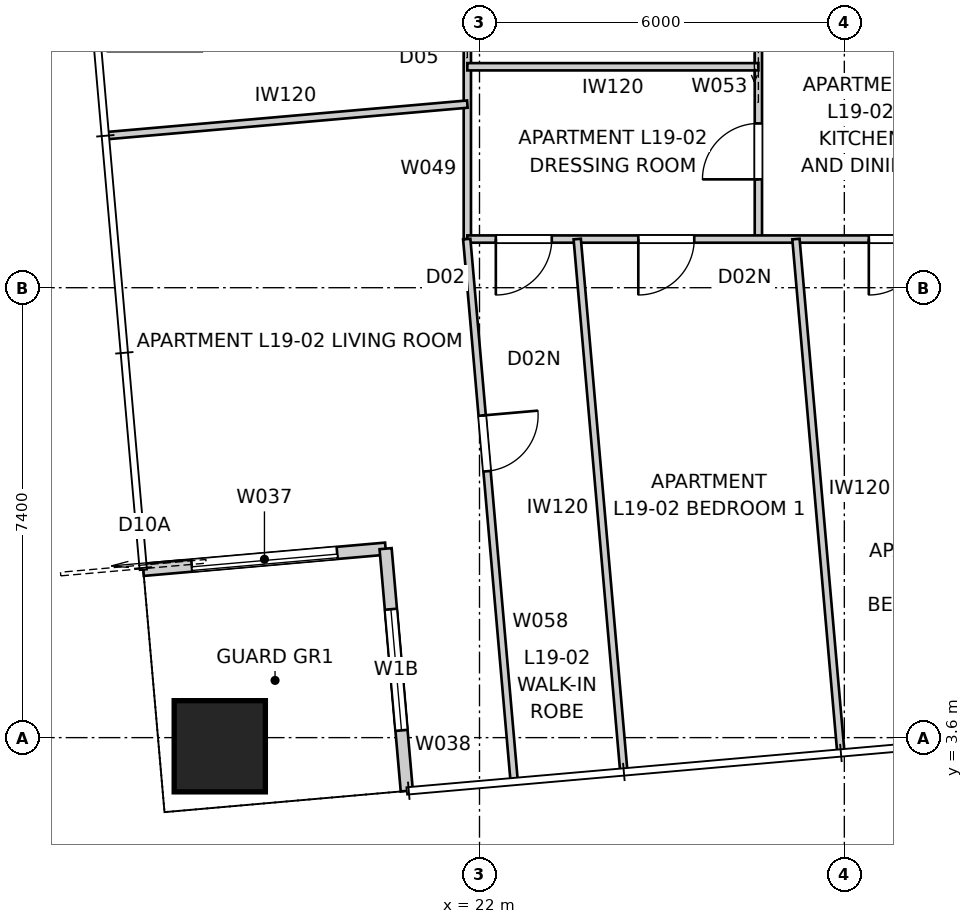
"""IFC4 building model, lengths in metres.
Left out: names, types, materials, properties, quantities, classifications, styles, units other than length and angle.
Written with IfcOpenShell. Run it as: python <this file> out.ifc"""

import sys

from ifc_helpers import new_model, si_unit, direction, frame, frame_2d, origin, origin_2d, place, context, subcontext, project, spatial, rectangle, extrude, element, fill, save


model = new_model("IFC4")
c1 = context("Model", 3, precision=1e-05, world=origin(), true_north=direction((0.0, 1.0)))
c2 = subcontext(c1, "Body", "Model", "MODEL_VIEW")
j1 = project(units=[si_unit("LENGTHUNIT", "METRE"), si_unit("PLANEANGLEUNIT", "RADIAN")], contexts=[c1])
p1 = place(None, origin())
s1 = spatial("IfcSite", under=j1, at=p1, CompositionType="ELEMENT")
p2 = place(p1, origin())
s2 = spatial("IfcBuilding", under=s1, at=p2, CompositionType="ELEMENT")
p3 = place(p2, frame((0.0, 0.0, 71.0)))
s3 = spatial("IfcBuildingStorey", under=s2, at=p3, CompositionType="ELEMENT", Elevation=71.0)
p4 = place(p3, frame((17.729, 3.458, 0.0), z_axis=(0.0, 0.0, 1.0), x_axis=(1.0, 0.0, 0.0)))
e1 = element("IfcColumn", 1, at=p4, inside=s3, PredefinedType="COLUMN", context=c2, shape_type="SweptSolid", body=[
    extrude(rectangle(XDim=1.5, YDim=1.5, at=origin_2d()), origin(), (0.0, 0.0, 1.0), 3.2),
])
p5 = place(p3, frame((16.471, 6.359, 0.0), z_axis=(0.0, 0.0, 1.0), x_axis=(0.99619418125, 0.087161650072, 0.0)))
e2 = element("IfcWall", 2, at=p5, inside=s3, PredefinedType="SOLIDWALL", context=c2, shape_type="SweptSolid", body=[
    extrude(rectangle(XDim=4.0, YDim=0.2, at=frame_2d((2.0, 0.0))), origin(), (0.0, 0.0, 1.0), 3.2),
])
p6 = place(p5, frame((0.8, 0.0, 0.0)))
e3 = element("IfcOpeningElement", 3, at=p6, cuts=e2, PredefinedType="OPENING", context=c2, shape_type="SweptSolid", body=[
    extrude(rectangle(XDim=2.4, YDim=2.1, at=frame_2d((1.2, 1.05))), frame((0.0, 0.11, 0.0), z_axis=(0.0, -1.0, 0.0), x_axis=(1.0, 0.0, 0.0)), (0.0, 0.0, 1.0), 0.22),
])
p7 = place(p3, frame((20.456, 6.708, 0.0), z_axis=(0.0, 0.0, 1.0), x_axis=(0.087156350505, -0.99619464492, 0.0)))
e4 = element("IfcWall", 4, at=p7, inside=s3, PredefinedType="SOLIDWALL", context=c2, shape_type="SweptSolid", body=[
    extrude(rectangle(XDim=4.0, YDim=0.2, at=frame_2d((2.0, 0.0))), origin(), (0.0, 0.0, 1.0), 3.2),
])
p8 = place(p7, frame((1.0, 0.0, 0.4)))
e5 = element("IfcOpeningElement", 5, at=p8, cuts=e4, PredefinedType="OPENING", context=c2, shape_type="SweptSolid", body=[
    extrude(rectangle(XDim=2.0, YDim=1.8, at=frame_2d((1.0, 0.9))), frame((0.0, 0.11, 0.0), z_axis=(0.0, -1.0, 0.0), x_axis=(1.0, 0.0, 0.0)), (0.0, 0.0, 1.0), 0.22),
])
p9 = place(p3, frame((21.8, 11.8, 0.0), z_axis=(0.0, 0.0, 1.0), x_axis=(0.0, 1.0, 0.0)))
e6 = element("IfcWall", 6, at=p9, inside=s3, PredefinedType="PARTITIONING", context=c2, shape_type="SweptSolid", body=[
    extrude(rectangle(XDim=20.065, YDim=0.12, at=frame_2d((10.032, 0.0))), origin(), (0.0, 0.0, 1.0), 3.2),
])
p10 = place(p9, frame((6.798, 0.0, 0.0)))
e7 = element("IfcOpeningElement", 7, at=p10, cuts=e6, PredefinedType="OPENING", context=c2, shape_type="SweptSolid", body=[
    extrude(rectangle(XDim=0.92, YDim=2.34, at=frame_2d((0.46, 1.17))), frame((0.0, 0.07, 0.0), z_axis=(0.0, -1.0, 0.0), x_axis=(1.0, 0.0, 0.0)), (0.0, 0.0, 1.0), 0.14),
])
p11 = place(p9, frame((3.845, 0.0, 0.0)))
e8 = element("IfcOpeningElement", 8, at=p11, cuts=e6, PredefinedType="OPENING", context=c2, shape_type="SweptSolid", body=[
    extrude(rectangle(XDim=0.96, YDim=2.1, at=frame_2d((0.48, 1.05))), frame((0.0, 0.07, 0.0), z_axis=(0.0, -1.0, 0.0), x_axis=(1.0, 0.0, 0.0)), (0.0, 0.0, 1.0), 0.14),
])
p12 = place(p9, frame((10.732, 0.0, 0.0)))
e9 = element("IfcOpeningElement", 9, at=p12, cuts=e6, PredefinedType="OPENING", context=c2, shape_type="SweptSolid", body=[
    extrude(rectangle(XDim=0.96, YDim=2.1, at=frame_2d((0.48, 1.05))), frame((0.0, 0.07, 0.0), z_axis=(0.0, -1.0, 0.0), x_axis=(1.0, 0.0, 0.0)), (0.0, 0.0, 1.0), 0.14),
])
p13 = place(p9, frame((17.856, 0.0, 0.0)))
e10 = element("IfcOpeningElement", 10, at=p13, cuts=e6, PredefinedType="OPENING", context=c2, shape_type="SweptSolid", body=[
    extrude(rectangle(XDim=0.96, YDim=2.1, at=frame_2d((0.48, 1.05))), frame((0.0, 0.07, 0.0), z_axis=(0.0, -1.0, 0.0), x_axis=(1.0, 0.0, 0.0)), (0.0, 0.0, 1.0), 0.14),
])
p14 = place(p9, frame((15.027, 0.0, 0.0)))
e11 = element("IfcOpeningElement", 11, at=p14, cuts=e6, PredefinedType="OPENING", context=c2, shape_type="SweptSolid", body=[
    extrude(rectangle(XDim=0.96, YDim=2.1, at=frame_2d((0.48, 1.05))), frame((0.0, 0.07, 0.0), z_axis=(0.0, -1.0, 0.0), x_axis=(1.0, 0.0, 0.0)), (0.0, 0.0, 1.0), 0.14),
])
p15 = place(p3, frame((26.586, 11.8, 0.0), z_axis=(0.0, 0.0, 1.0), x_axis=(0.0, 1.0, 0.0)))
e12 = element("IfcWall", 12, at=p15, inside=s3, PredefinedType="PARTITIONING", context=c2, shape_type="SweptSolid", body=[
    extrude(rectangle(XDim=4.4, YDim=0.12, at=frame_2d((2.2, 0.0))), origin(), (0.0, 0.0, 1.0), 3.2),
])
p16 = place(p15, frame((0.982, 0.0, 0.0)))
e13 = element("IfcOpeningElement", 13, at=p16, cuts=e12, PredefinedType="OPENING", context=c2, shape_type="SweptSolid", body=[
    extrude(rectangle(XDim=0.92, YDim=2.0, at=frame_2d((0.46, 1.0))), frame((0.0, 0.07, 0.0), z_axis=(0.0, -1.0, 0.0), x_axis=(1.0, 0.0, 0.0)), (0.0, 0.0, 1.0), 0.14),
])
p17 = place(p15, frame((3.112, 0.0, 0.0)))
e14 = element("IfcOpeningElement", 14, at=p17, cuts=e12, PredefinedType="OPENING", context=c2, shape_type="SweptSolid", body=[
    extrude(rectangle(XDim=0.96, YDim=2.1, at=frame_2d((0.48, 1.05))), frame((0.0, 0.07, 0.0), z_axis=(0.0, -1.0, 0.0), x_axis=(1.0, 0.0, 0.0)), (0.0, 0.0, 1.0), 0.14),
])
p18 = place(p3, frame((58.2, 11.8, 0.0), z_axis=(0.0, 0.0, 1.0), x_axis=(-1.0, 0.0, 0.0)))
e15 = element("IfcWall", 15, at=p18, inside=s3, PredefinedType="PARTITIONING", context=c2, shape_type="SweptSolid", body=[
    extrude(rectangle(XDim=36.4, YDim=0.12, at=frame_2d((18.2, 0.0))), origin(), (0.0, 0.0, 1.0), 3.2),
])
p19 = place(p18, frame((11.12, 0.0, 0.0)))
e16 = element("IfcOpeningElement", 16, at=p19, cuts=e15, PredefinedType="OPENING", context=c2, shape_type="SweptSolid", body=[
    extrude(rectangle(XDim=0.92, YDim=2.34, at=frame_2d((0.46, 1.17))), frame((0.0, 0.07, 0.0), z_axis=(0.0, -1.0, 0.0), x_axis=(1.0, 0.0, 0.0)), (0.0, 0.0, 1.0), 0.14),
])
p20 = place(p18, frame((17.971, 0.0, 0.0)))
e17 = element("IfcOpeningElement", 17, at=p20, cuts=e15, PredefinedType="OPENING", context=c2, shape_type="SweptSolid", body=[
    extrude(rectangle(XDim=0.92, YDim=2.34, at=frame_2d((0.46, 1.17))), frame((0.0, 0.07, 0.0), z_axis=(0.0, -1.0, 0.0), x_axis=(1.0, 0.0, 0.0)), (0.0, 0.0, 1.0), 0.14),
])
p21 = place(p18, frame((28.877, 0.0, 0.0)))
e18 = element("IfcOpeningElement", 18, at=p21, cuts=e15, PredefinedType="OPENING", context=c2, shape_type="SweptSolid", body=[
    extrude(rectangle(XDim=0.92, YDim=2.34, at=frame_2d((0.46, 1.17))), frame((0.0, 0.07, 0.0), z_axis=(0.0, -1.0, 0.0), x_axis=(1.0, 0.0, 0.0)), (0.0, 0.0, 1.0), 0.14),
])
p22 = place(p18, frame((7.16, 0.0, 0.0)))
e19 = element("IfcOpeningElement", 19, at=p22, cuts=e15, PredefinedType="OPENING", context=c2, shape_type="SweptSolid", body=[
    extrude(rectangle(XDim=0.96, YDim=2.1, at=frame_2d((0.48, 1.05))), frame((0.0, 0.07, 0.0), z_axis=(0.0, -1.0, 0.0), x_axis=(1.0, 0.0, 0.0)), (0.0, 0.0, 1.0), 0.14),
])
p23 = place(p18, frame((15.181, 0.0, 0.0)))
e20 = element("IfcOpeningElement", 20, at=p23, cuts=e15, PredefinedType="OPENING", context=c2, shape_type="SweptSolid", body=[
    extrude(rectangle(XDim=0.96, YDim=2.1, at=frame_2d((0.48, 1.05))), frame((0.0, 0.07, 0.0), z_axis=(0.0, -1.0, 0.0), x_axis=(1.0, 0.0, 0.0)), (0.0, 0.0, 1.0), 0.14),
])
p24 = place(p18, frame((32.668, 0.0, 0.0)))
e21 = element("IfcOpeningElement", 21, at=p24, cuts=e15, PredefinedType="OPENING", context=c2, shape_type="SweptSolid", body=[
    extrude(rectangle(XDim=0.92, YDim=2.0, at=frame_2d((0.46, 1.0))), frame((0.0, 0.07, 0.0), z_axis=(0.0, -1.0, 0.0), x_axis=(1.0, 0.0, 0.0)), (0.0, 0.0, 1.0), 0.14),
])
p25 = place(p18, frame((35.011, 0.0, 0.0)))
e22 = element("IfcOpeningElement", 22, at=p25, cuts=e15, PredefinedType="OPENING", context=c2, shape_type="SweptSolid", body=[
    extrude(rectangle(XDim=0.92, YDim=2.34, at=frame_2d((0.46, 1.17))), frame((0.0, 0.07, 0.0), z_axis=(0.0, -1.0, 0.0), x_axis=(1.0, 0.0, 0.0)), (0.0, 0.0, 1.0), 0.14),
])
p26 = place(p18, frame((0.675, 0.0, 0.0)))
e23 = element("IfcOpeningElement", 23, at=p26, cuts=e15, PredefinedType="OPENING", context=c2, shape_type="SweptSolid", body=[
    extrude(rectangle(XDim=0.92, YDim=2.34, at=frame_2d((0.46, 1.17))), frame((0.0, 0.07, 0.0), z_axis=(0.0, -1.0, 0.0), x_axis=(1.0, 0.0, 0.0)), (0.0, 0.0, 1.0), 0.14),
])
p27 = place(p18, frame((25.11, 0.0, 0.0)))
e24 = element("IfcOpeningElement", 24, at=p27, cuts=e15, PredefinedType="OPENING", context=c2, shape_type="SweptSolid", body=[
    extrude(rectangle(XDim=0.96, YDim=2.1, at=frame_2d((0.48, 1.05))), frame((0.0, 0.07, 0.0), z_axis=(0.0, -1.0, 0.0), x_axis=(1.0, 0.0, 0.0)), (0.0, 0.0, 1.0), 0.14),
])
p28 = place(p18, frame((3.904, 0.0, 0.0)))
e25 = element("IfcOpeningElement", 25, at=p28, cuts=e15, PredefinedType="OPENING", context=c2, shape_type="SweptSolid", body=[
    extrude(rectangle(XDim=0.96, YDim=2.1, at=frame_2d((0.48, 1.05))), frame((0.0, 0.07, 0.0), z_axis=(0.0, -1.0, 0.0), x_axis=(1.0, 0.0, 0.0)), (0.0, 0.0, 1.0), 0.14),
])
p29 = place(p3, frame((26.586, 14.634, 0.0), z_axis=(0.0, 0.0, 1.0), x_axis=(-1.0, 0.0, 0.0)))
e26 = element("IfcWall", 26, at=p29, inside=s3, PredefinedType="PARTITIONING", context=c2, shape_type="SweptSolid", body=[
    extrude(rectangle(XDim=4.786, YDim=0.12, at=frame_2d((2.393, 0.0))), origin(), (0.0, 0.0, 1.0), 2.399),
])
p30 = place(p3, frame((15.886, 13.502, 0.0), z_axis=(0.0, 0.0, 1.0), x_axis=(0.996195547509, 0.087146033323, 0.0)))
e27 = element("IfcWall", 27, at=p30, inside=s3, PredefinedType="PARTITIONING", context=c2, shape_type="SweptSolid", body=[
    extrude(rectangle(XDim=5.937, YDim=0.12, at=frame_2d((2.968, 0.0))), origin(), (0.0, 0.0, 1.0), 2.399),
])
p31 = place(p3, frame((21.79, 11.8, 0.0), z_axis=(0.0, 0.0, 1.0), x_axis=(0.087153024244, -0.996194935926, 0.0)))
e28 = element("IfcWall", 28, at=p31, inside=s3, PredefinedType="PARTITIONING", context=c2, shape_type="SweptSolid", body=[
    extrude(rectangle(XDim=8.917, YDim=0.12, at=frame_2d((4.458, 0.0))), origin(), (0.0, 0.0, 1.0), 3.2),
])
p32 = place(p31, frame((2.913, 0.0, 0.0)))
e29 = element("IfcOpeningElement", 29, at=p32, cuts=e28, PredefinedType="OPENING", context=c2, shape_type="SweptSolid", body=[
    extrude(rectangle(XDim=0.92, YDim=2.0, at=frame_2d((0.46, 1.0))), frame((0.0, 0.07, 0.0), z_axis=(0.0, -1.0, 0.0), x_axis=(1.0, 0.0, 0.0)), (0.0, 0.0, 1.0), 0.14),
])
p33 = place(p3, frame((27.204, 11.8, 0.0), z_axis=(0.0, 0.0, 1.0), x_axis=(0.087167308925, -0.996193686115, 0.0)))
e30 = element("IfcWall", 30, at=p33, inside=s3, PredefinedType="PARTITIONING", context=c2, shape_type="SweptSolid", body=[
    extrude(rectangle(XDim=8.445, YDim=0.12, at=frame_2d((4.222, 0.0))), origin(), (0.0, 0.0, 1.0), 2.399),
])
p34 = place(p3, frame((24.371, 3.075, 0.0), z_axis=(0.0, 0.0, 1.0), x_axis=(-0.087169716747, 0.996193475426, 0.0)))
e31 = element("IfcWall", 31, at=p34, inside=s3, PredefinedType="PARTITIONING", context=c2, shape_type="SweptSolid", body=[
    extrude(rectangle(XDim=8.758, YDim=0.12, at=frame_2d((4.379, 0.0))), origin(), (0.0, 0.0, 1.0), 3.2),
])
p35 = place(p6, origin())
e32 = element("IfcDoor", 32, at=p35, inside=s3, OperationType="SLIDING_TO_LEFT", PredefinedType="DOOR", context=c2, shape_type="SweptSolid", body=[
    extrude(rectangle(XDim=2.4, YDim=2.1, at=frame_2d((1.2, 1.05))), frame((0.0, 0.025, 0.0), z_axis=(0.0, -1.0, 0.0), x_axis=(1.0, 0.0, 0.0)), (0.0, 0.0, 1.0), 0.05),
])
fill(e3, e32)
p36 = place(p8, origin())
e33 = element("IfcWindow", 33, at=p36, inside=s3, PartitioningType="SINGLE_PANEL", PredefinedType="WINDOW", context=c2, shape_type="SweptSolid", body=[
    extrude(rectangle(XDim=2.0, YDim=1.8, at=frame_2d((1.0, 0.9))), frame((0.0, 0.03, 0.0), z_axis=(0.0, -1.0, 0.0), x_axis=(1.0, 0.0, 0.0)), (0.0, 0.0, 1.0), 0.06),
])
fill(e5, e33)
p37 = place(p21, origin())
e34 = element("IfcDoor", 34, at=p37, inside=s3, OperationType="SINGLE_SWING_RIGHT", PredefinedType="DOOR", context=c2, shape_type="SweptSolid", body=[
    extrude(rectangle(XDim=0.92, YDim=2.34, at=frame_2d((0.46, 1.17))), frame((0.0, 0.025, 0.0), z_axis=(0.0, -1.0, 0.0), x_axis=(1.0, 0.0, 0.0)), (0.0, 0.0, 1.0), 0.05),
])
fill(e18, e34)
p38 = place(p16, origin())
e35 = element("IfcDoor", 35, at=p38, inside=s3, OperationType="SINGLE_SWING_LEFT", PredefinedType="DOOR", context=c2, shape_type="SweptSolid", body=[
    extrude(rectangle(XDim=0.92, YDim=2.0, at=frame_2d((0.46, 1.0))), frame((0.0, 0.025, 0.0), z_axis=(0.0, -1.0, 0.0), x_axis=(1.0, 0.0, 0.0)), (0.0, 0.0, 1.0), 0.05),
])
fill(e13, e35)
p39 = place(p24, origin())
e36 = element("IfcDoor", 36, at=p39, inside=s3, OperationType="SINGLE_SWING_RIGHT", PredefinedType="DOOR", context=c2, shape_type="SweptSolid", body=[
    extrude(rectangle(XDim=0.92, YDim=2.0, at=frame_2d((0.46, 1.0))), frame((0.0, 0.025, 0.0), z_axis=(0.0, -1.0, 0.0), x_axis=(1.0, 0.0, 0.0)), (0.0, 0.0, 1.0), 0.05),
])
fill(e21, e36)
p40 = place(p25, origin())
e37 = element("IfcDoor", 37, at=p40, inside=s3, OperationType="SINGLE_SWING_RIGHT", PredefinedType="DOOR", context=c2, shape_type="SweptSolid", body=[
    extrude(rectangle(XDim=0.92, YDim=2.34, at=frame_2d((0.46, 1.17))), frame((0.0, 0.025, 0.0), z_axis=(0.0, -1.0, 0.0), x_axis=(1.0, 0.0, 0.0)), (0.0, 0.0, 1.0), 0.05),
])
fill(e22, e37)
p41 = place(p32, origin())
e38 = element("IfcDoor", 38, at=p41, inside=s3, OperationType="SINGLE_SWING_LEFT", PredefinedType="DOOR", context=c2, shape_type="SweptSolid", body=[
    extrude(rectangle(XDim=0.92, YDim=2.0, at=frame_2d((0.46, 1.0))), frame((0.0, 0.025, 0.0), z_axis=(0.0, -1.0, 0.0), x_axis=(1.0, 0.0, 0.0)), (0.0, 0.0, 1.0), 0.05),
])
fill(e29, e38)
save(model, sys.argv[1])
